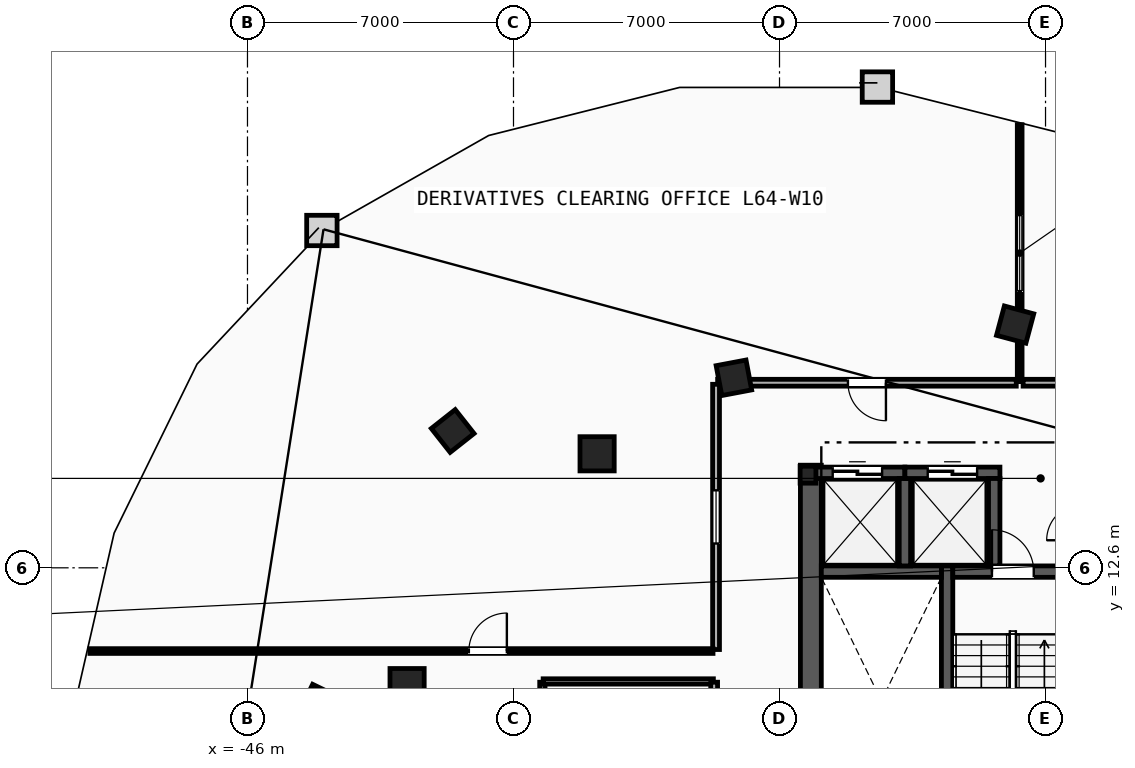
"""IFC4 building model, lengths in metres.
Left out: names, types, materials, properties, quantities, classifications, styles, units other than length and angle.
Written with IfcOpenShell. Run it as: python <this file> out.ifc"""

import sys

from ifc_helpers import new_model, si_unit, direction, frame, frame_2d, origin, origin_2d, place, context, subcontext, project, spatial, rectangle, i_section, extrude, element, fill, save


model = new_model("IFC4")
c1 = context("Model", 3, precision=1e-05, world=origin(), true_north=direction((0.0, 1.0)))
c2 = subcontext(c1, "Body", "Model", "MODEL_VIEW")
j1 = project(units=[si_unit("LENGTHUNIT", "METRE"), si_unit("PLANEANGLEUNIT", "RADIAN")], contexts=[c1])
p1 = place(None, origin())
s1 = spatial("IfcSite", under=j1, at=p1, CompositionType="ELEMENT")
p2 = place(p1, origin())
s2 = spatial("IfcBuilding", under=s1, at=p2, CompositionType="ELEMENT")
p3 = place(p2, frame((0.0, 0.0, 243.2)))
s3 = spatial("IfcBuildingStorey", under=s2, at=p3, CompositionType="ELEMENT", Elevation=243.2)
p4 = place(p3, frame((-31.25, 15.05, 0.0), z_axis=(0.0, 0.0, 1.0), x_axis=(1.0, 0.0, 0.0)))
e1 = element("IfcColumn", 1, at=p4, inside=s3, PredefinedType="COLUMN", context=c2, shape_type="SweptSolid", body=[
    extrude(i_section(OverallWidth=0.416, OverallDepth=0.446, WebThickness=0.039, FlangeThickness=0.063, FilletRadius=0.018, at=origin_2d()), origin(), (0.0, 0.0, 1.0), 3.6),
])
for number, where, z_axis, x_axis in (
    (2, (-41.8, 9.5, 0.0), (0.0, 0.0, 1.0), (1.0, 0.0, 0.0)),
    (3, (-36.8, 15.6, 0.0), (0.0, 0.0, 1.0), (1.0, 0.0, 0.0)),
):
    element("IfcColumn", number, at=place(p3, frame(where, z_axis=z_axis, x_axis=x_axis)), inside=s3, PredefinedType="COLUMN", context=c2, shape_type="SweptSolid", body=[
        extrude(rectangle(XDim=0.9, YDim=0.9, at=origin_2d()), origin(), (0.0, 0.0, 1.0), 3.6),
    ])
for number, where, z_axis, x_axis in (
    (4, (-25.8, 19.0, 0.0), (0.0, 0.0, 1.0), (-0.966, 0.259, 0.0)),
    (5, (-33.2, 17.6, 0.0), (0.0, 0.0, 1.0), (-0.983, -0.186, 0.0)),
    (6, (-40.6, 16.2, 0.0), (0.0, 0.0, 1.0), (-0.785, -0.619, 0.0)),
    (7, (-44.1, 9.0, 0.0), (0.0, 0.0, 1.0), (-0.437, -0.899, 0.0)),
):
    element("IfcColumn", number, at=place(p3, frame(where, z_axis=z_axis, x_axis=x_axis)), inside=s3, PredefinedType="COLUMN", context=c2, shape_type="SweptSolid", body=[
        extrude(rectangle(XDim=0.8, YDim=0.8, at=origin_2d()), origin(), (0.0, 0.0, 1.0), 3.6),
    ])
p5 = place(p3, frame((-31.175, 1.97, 0.0), z_axis=(0.0, 0.0, 1.0), x_axis=(0.0, 1.0, 0.0)))
e8 = element("IfcWall", 8, at=p5, inside=s3, PredefinedType="SHEAR", context=c2, shape_type="SweptSolid", body=[
    extrude(rectangle(XDim=13.33, YDim=0.55, at=frame_2d((6.665, 0.0))), origin(), (0.0, 0.0, 1.0), 3.34),
])
p6 = place(p3, frame((-27.59, 1.97, 0.0), z_axis=(0.0, 0.0, 1.0), x_axis=(0.0, 1.0, 0.0)))
e9 = element("IfcWall", 9, at=p6, inside=s3, PredefinedType="SHEAR", context=c2, shape_type="SweptSolid", body=[
    extrude(rectangle(XDim=10.68, YDim=0.3, at=frame_2d((5.34, 0.0))), origin(), (0.0, 0.0, 1.0), 3.34),
])
p7 = place(p3, frame((-30.9, 12.5, 0.0), z_axis=(0.0, 0.0, 1.0), x_axis=(1.0, 0.0, 0.0)))
e10 = element("IfcWall", 10, at=p7, inside=s3, PredefinedType="SHEAR", context=c2, shape_type="SweptSolid", body=[
    extrude(rectangle(XDim=3.16, YDim=0.3, at=frame_2d((1.58, 0.0))), origin(), (0.0, 0.0, 1.0), 3.34),
])
p8 = place(p3, frame((-27.44, 12.5, 0.0), z_axis=(0.0, 0.0, 1.0), x_axis=(1.0, 0.0, 0.0)))
e11 = element("IfcWall", 11, at=p8, inside=s3, PredefinedType="SHEAR", context=c2, shape_type="SweptSolid", body=[
    extrude(rectangle(XDim=3.16, YDim=0.3, at=frame_2d((1.58, 0.0))), origin(), (0.0, 0.0, 1.0), 3.34),
])
p9 = place(p8, frame((1.03, 0.0, 0.0)))
e12 = element("IfcOpeningElement", 12, at=p9, cuts=e11, PredefinedType="OPENING", context=c2, shape_type="SweptSolid", body=[
    extrude(rectangle(XDim=1.1, YDim=2.15, at=frame_2d((0.55, 1.075))), frame((0.0, 0.16, 0.0), z_axis=(0.0, -1.0, 0.0), x_axis=(1.0, 0.0, 0.0)), (0.0, 0.0, 1.0), 0.32),
])
p10 = place(p3, frame((-31.2, 15.1, 0.0), z_axis=(0.0, 0.0, 1.0), x_axis=(1.0, 0.0, 0.0)))
e13 = element("IfcWall", 13, at=p10, inside=s3, PredefinedType="SHEAR", context=c2, shape_type="SweptSolid", body=[
    extrude(rectangle(XDim=2.5, YDim=0.3, at=frame_2d((1.25, 0.0))), origin(), (0.0, 0.0, 1.0), 3.34),
])
p11 = place(p10, frame((0.6, 0.0, 0.0)))
e14 = element("IfcOpeningElement", 14, at=p11, cuts=e13, PredefinedType="OPENING", context=c2, shape_type="SweptSolid", body=[
    extrude(rectangle(XDim=1.3, YDim=2.2, at=frame_2d((0.65, 1.1))), frame((0.0, 0.16, 0.0), z_axis=(0.0, -1.0, 0.0), x_axis=(1.0, 0.0, 0.0)), (0.0, 0.0, 1.0), 0.32),
])
p12 = place(p3, frame((-28.7, 12.65, 0.0), z_axis=(0.0, 0.0, 1.0), x_axis=(0.0, 1.0, 0.0)))
e15 = element("IfcWall", 15, at=p12, inside=s3, PredefinedType="SHEAR", context=c2, shape_type="SweptSolid", body=[
    extrude(rectangle(XDim=2.3, YDim=0.3, at=frame_2d((1.15, 0.0))), origin(), (0.0, 0.0, 1.0), 3.34),
])
p13 = place(p3, frame((-28.7, 15.1, 0.0), z_axis=(0.0, 0.0, 1.0), x_axis=(1.0, 0.0, 0.0)))
e16 = element("IfcWall", 16, at=p13, inside=s3, PredefinedType="SHEAR", context=c2, shape_type="SweptSolid", body=[
    extrude(rectangle(XDim=2.5, YDim=0.3, at=frame_2d((1.25, 0.0))), origin(), (0.0, 0.0, 1.0), 3.34),
])
p14 = place(p13, frame((0.6, 0.0, 0.0)))
e17 = element("IfcOpeningElement", 17, at=p14, cuts=e16, PredefinedType="OPENING", context=c2, shape_type="SweptSolid", body=[
    extrude(rectangle(XDim=1.3, YDim=2.2, at=frame_2d((0.65, 1.1))), frame((0.0, 0.16, 0.0), z_axis=(0.0, -1.0, 0.0), x_axis=(1.0, 0.0, 0.0)), (0.0, 0.0, 1.0), 0.32),
])
p15 = place(p3, frame((-26.35, 12.65, 0.0), z_axis=(0.0, 0.0, 1.0), x_axis=(0.0, 1.0, 0.0)))
e18 = element("IfcWall", 18, at=p15, inside=s3, PredefinedType="SHEAR", context=c2, shape_type="SweptSolid", body=[
    extrude(rectangle(XDim=2.3, YDim=0.3, at=frame_2d((1.15, 0.0))), origin(), (0.0, 0.0, 1.0), 3.34),
])
p16 = place(p3, frame((-38.24, 5.415, 0.0), z_axis=(0.0, 0.0, 1.0), x_axis=(0.0, 1.0, 0.0)))
e19 = element("IfcWall", 19, at=p16, inside=s3, PredefinedType="PARTITIONING", context=c2, shape_type="SweptSolid", body=[
    extrude(rectangle(XDim=4.175, YDim=0.14, at=frame_2d((2.087, 0.0))), origin(), (0.0, 0.0, 1.0), 3.34),
])
p17 = place(p3, frame((-38.22, 9.61, 0.0), z_axis=(0.0, 0.0, 1.0), x_axis=(1.0, 0.0, 0.0)))
e20 = element("IfcWall", 20, at=p17, inside=s3, PredefinedType="PARTITIONING", context=c2, shape_type="SweptSolid", body=[
    extrude(rectangle(XDim=4.48, YDim=0.14, at=frame_2d((2.24, 0.0))), origin(), (0.0, 0.0, 1.0), 3.34),
])
p18 = place(p3, frame((-33.72, 5.43, 0.0), z_axis=(0.0, 0.0, 1.0), x_axis=(0.0, 1.0, 0.0)))
e21 = element("IfcWall", 21, at=p18, inside=s3, PredefinedType="PARTITIONING", context=c2, shape_type="SweptSolid", body=[
    extrude(rectangle(XDim=4.16, YDim=0.18, at=frame_2d((2.08, 0.0))), origin(), (0.0, 0.0, 1.0), 3.34),
])
p19 = place(p18, frame((1.58, 0.0, 0.0)))
e22 = element("IfcOpeningElement", 22, at=p19, cuts=e21, PredefinedType="OPENING", context=c2, shape_type="SweptSolid", body=[
    extrude(rectangle(XDim=1.0, YDim=2.15, at=frame_2d((0.5, 1.075))), frame((0.0, 0.1, 0.0), z_axis=(0.0, -1.0, 0.0), x_axis=(1.0, 0.0, 0.0)), (0.0, 0.0, 1.0), 0.2),
])
p20 = place(p3, frame((-25.68, 17.5, 0.0), z_axis=(0.0, 0.0, 1.0), x_axis=(0.0, 1.0, 0.0)))
e23 = element("IfcWall", 23, at=p20, inside=s3, PredefinedType="PARTITIONING", context=c2, shape_type="SweptSolid", body=[
    extrude(rectangle(XDim=6.76, YDim=0.125, at=frame_2d((3.38, 0.0))), origin(), (0.0, 0.0, 1.0), 3.34),
])
p21 = place(p20, frame((2.38, 0.0, 1.05)))
e24 = element("IfcOpeningElement", 24, at=p21, cuts=e23, PredefinedType="OPENING", context=c2, shape_type="SweptSolid", body=[
    extrude(rectangle(XDim=2.0, YDim=1.5, at=frame_2d((1.0, 0.75))), frame((0.0, 0.073, 0.0), z_axis=(0.0, -1.0, 0.0), x_axis=(1.0, 0.0, 0.0)), (0.0, 0.0, 1.0), 0.145),
])
p22 = place(p3, frame((-21.122, 17.47, 0.0), z_axis=(0.0, 0.0, 1.0), x_axis=(-1.0, 0.0, 0.0)))
e25 = element("IfcWall", 25, at=p22, inside=s3, PredefinedType="PARTITIONING", context=c2, shape_type="SweptSolid", body=[
    extrude(rectangle(XDim=4.469, YDim=0.18, at=frame_2d((2.234, 0.0))), origin(), (0.0, 0.0, 1.0), 3.34),
])
p23 = place(p22, frame((1.734, 0.0, 0.0)))
e26 = element("IfcOpeningElement", 26, at=p23, cuts=e25, PredefinedType="OPENING", context=c2, shape_type="SweptSolid", body=[
    extrude(rectangle(XDim=1.0, YDim=2.15, at=frame_2d((0.5, 1.075))), frame((0.0, 0.1, 0.0), z_axis=(0.0, -1.0, 0.0), x_axis=(1.0, 0.0, 0.0)), (0.0, 0.0, 1.0), 0.2),
])
p24 = place(p3, frame((-25.77, 17.47, 0.0), z_axis=(0.0, 0.0, 1.0), x_axis=(-1.0, 0.0, 0.0)))
e27 = element("IfcWall", 27, at=p24, inside=s3, PredefinedType="PARTITIONING", context=c2, shape_type="SweptSolid", body=[
    extrude(rectangle(XDim=7.858, YDim=0.18, at=frame_2d((3.929, 0.0))), origin(), (0.0, 0.0, 1.0), 3.34),
])
p25 = place(p24, frame((3.429, 0.0, 0.0)))
e28 = element("IfcOpeningElement", 28, at=p25, cuts=e27, PredefinedType="OPENING", context=c2, shape_type="SweptSolid", body=[
    extrude(rectangle(XDim=1.0, YDim=2.15, at=frame_2d((0.5, 1.075))), frame((0.0, 0.1, 0.0), z_axis=(0.0, -1.0, 0.0), x_axis=(1.0, 0.0, 0.0)), (0.0, 0.0, 1.0), 0.2),
])
p26 = place(p3, frame((-33.67, 17.428, 0.0), z_axis=(0.0, 0.0, 1.0), x_axis=(0.0, -1.0, 0.0)))
e29 = element("IfcWall", 29, at=p26, inside=s3, PredefinedType="PARTITIONING", context=c2, shape_type="SweptSolid", body=[
    extrude(rectangle(XDim=6.979, YDim=0.18, at=frame_2d((3.489, 0.0))), origin(), (0.0, 0.0, 1.0), 3.34),
])
p27 = place(p26, frame((2.789, 0.0, 1.05)))
e30 = element("IfcOpeningElement", 30, at=p27, cuts=e29, PredefinedType="OPENING", context=c2, shape_type="SweptSolid", body=[
    extrude(rectangle(XDim=1.4, YDim=1.5, at=frame_2d((0.7, 0.75))), frame((0.0, 0.1, 0.0), z_axis=(0.0, -1.0, 0.0), x_axis=(1.0, 0.0, 0.0)), (0.0, 0.0, 1.0), 0.2),
])
p28 = place(p3, frame((-50.146, 10.41, 0.0), z_axis=(0.0, 0.0, 1.0), x_axis=(1.0, 0.0, 0.0)))
e31 = element("IfcWall", 31, at=p28, inside=s3, PredefinedType="PARTITIONING", context=c2, shape_type="SweptSolid", body=[
    extrude(rectangle(XDim=16.396, YDim=0.125, at=frame_2d((8.198, 0.0))), origin(), (0.0, 0.0, 1.0), 3.34),
])
p29 = place(p28, frame((9.971, 0.0, 0.0)))
e32 = element("IfcOpeningElement", 32, at=p29, cuts=e31, PredefinedType="OPENING", context=c2, shape_type="SweptSolid", body=[
    extrude(rectangle(XDim=1.0, YDim=2.15, at=frame_2d((0.5, 1.075))), frame((0.0, 0.073, 0.0), z_axis=(0.0, -1.0, 0.0), x_axis=(1.0, 0.0, 0.0)), (0.0, 0.0, 1.0), 0.145),
])
p30 = place(p9, origin())
e33 = element("IfcDoor", 33, at=p30, inside=s3, OperationType="SINGLE_SWING_LEFT", PredefinedType="DOOR", context=c2, shape_type="SweptSolid", body=[
    extrude(rectangle(XDim=1.1, YDim=2.15, at=frame_2d((0.55, 1.075))), frame((0.0, 0.025, 0.0), z_axis=(0.0, -1.0, 0.0), x_axis=(1.0, 0.0, 0.0)), (0.0, 0.0, 1.0), 0.05),
])
fill(e12, e33)
p31 = place(p11, origin())
e34 = element("IfcDoor", 34, at=p31, inside=s3, OperationType="SLIDING_TO_LEFT", PredefinedType="TRAPDOOR", context=c2, shape_type="SweptSolid", body=[
    extrude(rectangle(XDim=1.3, YDim=2.2, at=frame_2d((0.65, 1.1))), frame((0.0, 0.025, 0.0), z_axis=(0.0, -1.0, 0.0), x_axis=(1.0, 0.0, 0.0)), (0.0, 0.0, 1.0), 0.05),
])
fill(e14, e34)
p32 = place(p14, origin())
e35 = element("IfcDoor", 35, at=p32, inside=s3, OperationType="SLIDING_TO_LEFT", PredefinedType="TRAPDOOR", context=c2, shape_type="SweptSolid", body=[
    extrude(rectangle(XDim=1.3, YDim=2.2, at=frame_2d((0.65, 1.1))), frame((0.0, 0.025, 0.0), z_axis=(0.0, -1.0, 0.0), x_axis=(1.0, 0.0, 0.0)), (0.0, 0.0, 1.0), 0.05),
])
fill(e17, e35)
p33 = place(p29, origin())
e36 = element("IfcDoor", 36, at=p33, inside=s3, OperationType="SINGLE_SWING_RIGHT", PredefinedType="DOOR", context=c2, shape_type="SweptSolid", body=[
    extrude(rectangle(XDim=1.0, YDim=2.15, at=frame_2d((0.5, 1.075))), frame((0.0, 0.025, 0.0), z_axis=(0.0, -1.0, 0.0), x_axis=(1.0, 0.0, 0.0)), (0.0, 0.0, 1.0), 0.05),
])
fill(e32, e36)
p34 = place(p25, origin())
e37 = element("IfcDoor", 37, at=p34, inside=s3, OperationType="SINGLE_SWING_LEFT", PredefinedType="DOOR", context=c2, shape_type="SweptSolid", body=[
    extrude(rectangle(XDim=1.0, YDim=2.15, at=frame_2d((0.5, 1.075))), frame((0.0, 0.025, 0.0), z_axis=(0.0, -1.0, 0.0), x_axis=(1.0, 0.0, 0.0)), (0.0, 0.0, 1.0), 0.05),
])
fill(e28, e37)
p35 = place(p21, origin())
e38 = element("IfcWindow", 38, at=p35, inside=s3, PartitioningType="SINGLE_PANEL", PredefinedType="WINDOW", context=c2, shape_type="SweptSolid", body=[
    extrude(rectangle(XDim=2.0, YDim=1.5, at=frame_2d((1.0, 0.75))), frame((0.0, 0.03, 0.0), z_axis=(0.0, -1.0, 0.0), x_axis=(1.0, 0.0, 0.0)), (0.0, 0.0, 1.0), 0.06),
])
fill(e24, e38)
p36 = place(p27, origin())
e39 = element("IfcWindow", 39, at=p36, inside=s3, PartitioningType="SINGLE_PANEL", PredefinedType="WINDOW", context=c2, shape_type="SweptSolid", body=[
    extrude(rectangle(XDim=1.4, YDim=1.5, at=frame_2d((0.7, 0.75))), frame((0.0, 0.03, 0.0), z_axis=(0.0, -1.0, 0.0), x_axis=(1.0, 0.0, 0.0)), (0.0, 0.0, 1.0), 0.06),
])
fill(e30, e39)
save(model, sys.argv[1])
